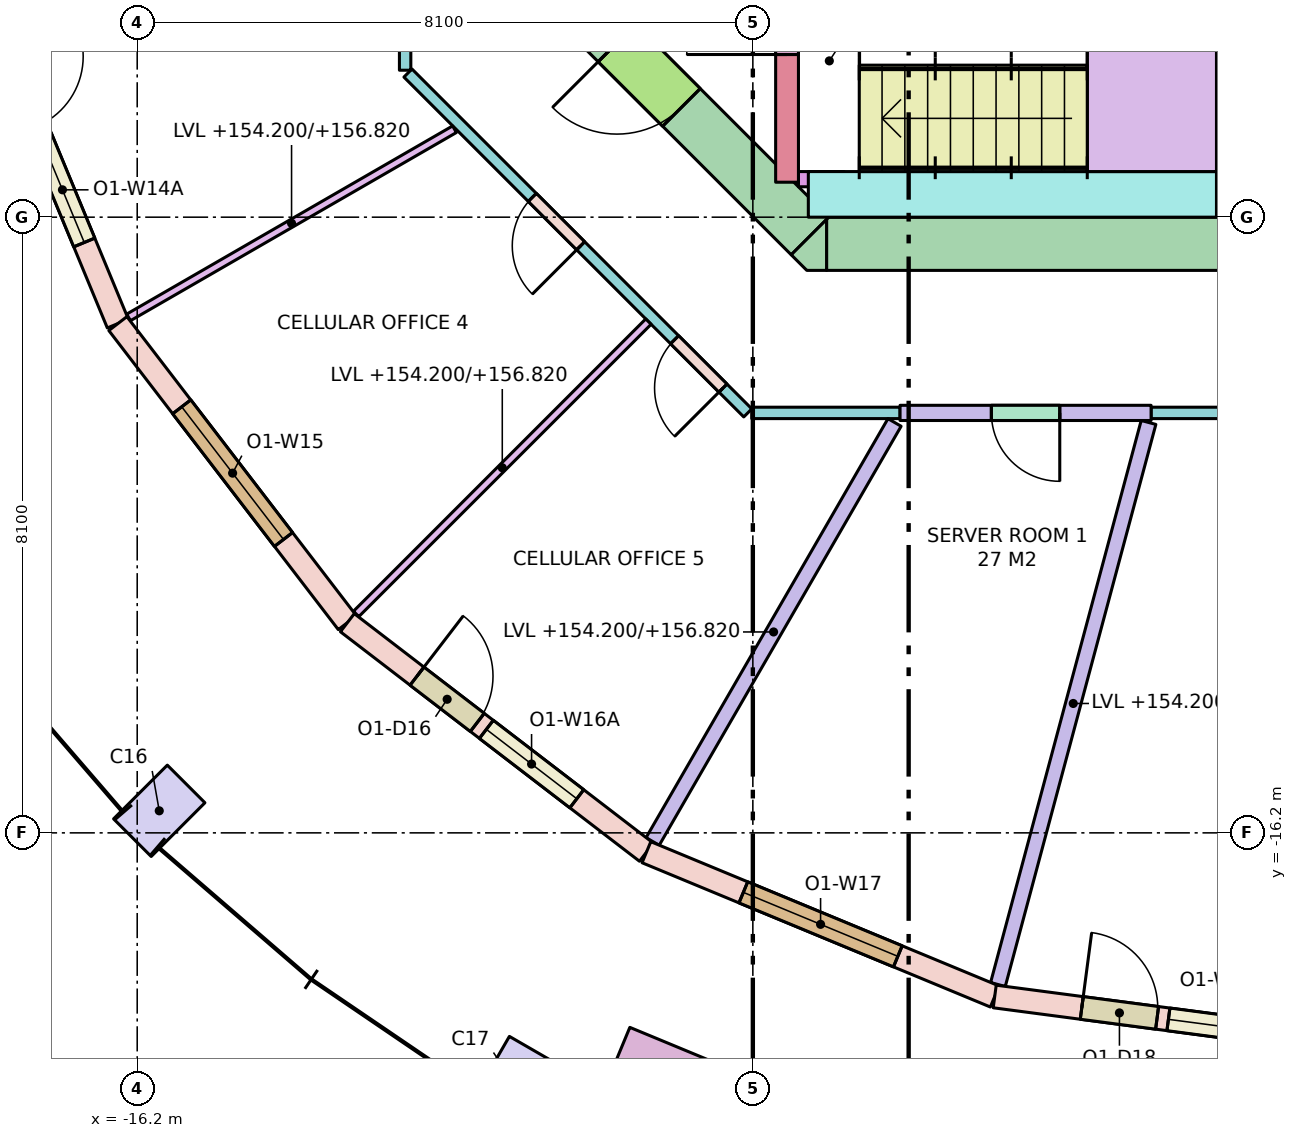
"""IFC4 building model, lengths in metres.
Left out: names, types, materials, properties, quantities, classifications, styles, units other than length and angle.
Written with IfcOpenShell. Run it as: python <this file> out.ifc"""

import sys

from ifc_helpers import new_model, si_unit, direction, frame, frame_2d, origin, origin_2d, place, context, subcontext, project, spatial, polyline, rectangle, outline, extrude, element, fill, save


model = new_model("IFC4")
c1 = context("Model", 3, precision=1e-05, world=origin(), true_north=direction((0.0, 1.0)))
c2 = subcontext(c1, "Body", "Model", "MODEL_VIEW")
j1 = project(units=[si_unit("LENGTHUNIT", "METRE"), si_unit("PLANEANGLEUNIT", "RADIAN")], contexts=[c1])
p1 = place(None, origin())
s1 = spatial("IfcSite", under=j1, at=p1, CompositionType="ELEMENT")
p2 = place(p1, origin())
s2 = spatial("IfcBuilding", under=s1, at=p2, CompositionType="ELEMENT")
p3 = place(p2, frame((0.0, 0.0, 154.2)))
s3 = spatial("IfcBuildingStorey", under=s2, at=p3, CompositionType="ELEMENT", Elevation=154.2)
for number, where, z_axis, x_axis in (
    (1, (-15.91, -15.91, 0.0), (0.0, 0.0, 1.0), (0.707, -0.707, 0.0)),
    (2, (-11.25, -19.486, 0.0), (0.0, 0.0, 1.0), (0.866, -0.5, 0.0)),
):
    element("IfcColumn", number, at=place(p3, frame(where, z_axis=z_axis, x_axis=x_axis)), inside=s3, PredefinedType="COLUMN", context=c2, shape_type="SweptSolid", body=[
        extrude(rectangle(XDim=0.7, YDim=1.0, at=origin_2d()), origin(), (0.0, 0.0, 1.0), 3.7),
    ])
p4 = place(p3, frame((-7.13, -8.45, -0.28), z_axis=(0.0, 0.0, 1.0), x_axis=(1.0, 0.0, 0.0)))
e3 = element("IfcWall", 3, at=p4, inside=s3, PredefinedType="SHEAR", context=c2, shape_type="SweptSolid", body=[
    extrude(rectangle(XDim=14.26, YDim=0.7, at=frame_2d((7.13, 0.0))), origin(), (0.0, 0.0, 1.0), 3.7),
])
p5 = place(p4, frame((8.08, 0.0, 0.28)))
e4 = element("IfcOpeningElement", 4, at=p5, cuts=e3, PredefinedType="OPENING", context=c2, shape_type="SweptSolid", body=[
    extrude(rectangle(XDim=0.7, YDim=2.1, at=frame_2d((0.35, 1.05))), frame((0.0, 0.36, 0.0), z_axis=(0.0, -1.0, 0.0), x_axis=(1.0, 0.0, 0.0)), (0.0, 0.0, 1.0), 0.72),
])
p6 = place(p4, frame((6.205, 0.0, 0.28)))
e5 = element("IfcOpeningElement", 5, at=p6, cuts=e3, PredefinedType="OPENING", context=c2, shape_type="SweptSolid", body=[
    extrude(rectangle(XDim=0.9, YDim=2.1, at=frame_2d((0.45, 1.05))), frame((0.0, 0.36, 0.0), z_axis=(0.0, -1.0, 0.0), x_axis=(1.0, 0.0, 0.0)), (0.0, 0.0, 1.0), 0.72),
])
p7 = place(p4, frame((10.667, 0.0, 0.28)))
e6 = element("IfcOpeningElement", 6, at=p7, cuts=e3, PredefinedType="OPENING", context=c2, shape_type="SweptSolid", body=[
    extrude(rectangle(XDim=0.9, YDim=2.1, at=frame_2d((0.45, 1.05))), frame((0.0, 0.36, 0.0), z_axis=(0.0, -1.0, 0.0), x_axis=(1.0, 0.0, 0.0)), (0.0, 0.0, 1.0), 0.72),
])
p8 = place(p3, frame((-7.347, -8.347, -0.28), z_axis=(0.0, 0.0, 1.0), x_axis=(-0.707106781187, 0.707106781187, 0.0)))
e7 = element("IfcWall", 7, at=p8, inside=s3, PredefinedType="SHEAR", context=c2, shape_type="SweptSolid", body=[
    extrude(rectangle(XDim=4.243, YDim=0.7, at=frame_2d((2.121, 0.0))), origin(), (0.0, 0.0, 1.0), 3.7),
])
p9 = place(p8, frame((2.393, 0.0, 0.28)))
e8 = element("IfcOpeningElement", 8, at=p9, cuts=e7, PredefinedType="OPENING", context=c2, shape_type="SweptSolid", body=[
    extrude(rectangle(XDim=1.2, YDim=2.1, at=frame_2d((0.6, 1.05))), frame((0.0, 0.36, 0.0), z_axis=(0.0, -1.0, 0.0), x_axis=(1.0, 0.0, 0.0)), (0.0, 0.0, 1.0), 0.72),
])
p10 = place(p3, frame((0.0, 0.0, -0.28)))
e9 = element("IfcWall", 9, at=p10, inside=s3, PredefinedType="SHEAR", context=c2, shape_type="SweptSolid", body=[
    extrude(outline(polyline([(-7.39, -8.8), (-7.595, -8.595), (-7.595, -8.595), (-7.595, -8.595), (-7.13, -8.13), (-7.13, -8.8), (-7.13, -8.8), (-7.39, -8.8)])), origin(), (0.0, 0.0, 1.0), 3.7),
])
p11 = place(p3, frame((-1.85, -8.1, 0.0), z_axis=(0.0, 0.0, 1.0), x_axis=(0.0, 1.0, 0.0)))
e10 = element("IfcWall", 10, at=p11, inside=s3, PredefinedType="SHEAR", context=c2, shape_type="SweptSolid", body=[
    extrude(rectangle(XDim=6.6, YDim=0.3, at=frame_2d((3.3, 0.0))), origin(), (0.0, 0.0, 1.0), 3.42),
])
p12 = place(p3, frame((-7.65, -7.64, 0.0), z_axis=(0.0, 0.0, 1.0), x_axis=(0.0, 1.0, 0.0)))
e11 = element("IfcWall", 11, at=p12, inside=s3, PredefinedType="SHEAR", context=c2, shape_type="SweptSolid", body=[
    extrude(rectangle(XDim=3.14, YDim=0.3, at=frame_2d((1.57, 0.0))), origin(), (0.0, 0.0, 1.0), 3.42),
])
p13 = place(p12, frame((1.68, 0.0, 0.0)))
e12 = element("IfcOpeningElement", 12, at=p13, cuts=e11, PredefinedType="OPENING", context=c2, shape_type="SweptSolid", body=[
    extrude(rectangle(XDim=1.32, YDim=2.1, at=frame_2d((0.66, 1.05))), frame((0.0, 0.16, 0.0), z_axis=(0.0, -1.0, 0.0), x_axis=(1.0, 0.0, 0.0)), (0.0, 0.0, 1.0), 0.32),
])
p14 = place(p3, frame((-7.5, -7.6, 0.0), z_axis=(0.0, 0.0, 1.0), x_axis=(1.0, 0.0, 0.0)))
e13 = element("IfcWall", 13, at=p14, inside=s3, PredefinedType="SHEAR", context=c2, shape_type="SweptSolid", body=[
    extrude(rectangle(XDim=0.6, YDim=0.2, at=frame_2d((0.3, 0.0))), origin(), (0.0, 0.0, 1.0), 3.42),
])
p15 = place(p3, frame((-7.37, -7.8, 0.0), z_axis=(0.0, 0.0, 1.0), x_axis=(1.0, 0.0, 0.0)))
e14 = element("IfcWall", 14, at=p15, inside=s3, PredefinedType="SHEAR", context=c2, shape_type="SweptSolid", body=[
    extrude(rectangle(XDim=5.37, YDim=0.6, at=frame_2d((2.685, 0.0))), origin(), (0.0, 0.0, 1.0), 3.42),
])
p16 = place(p3, frame((-18.353, -4.917, 0.0), z_axis=(0.0, 0.0, 1.0), x_axis=(0.382650301762, -0.923893254961, 0.0)))
e15 = element("IfcWall", 15, at=p16, inside=s3, PredefinedType="STANDARD", context=c2, shape_type="SweptSolid", body=[
    extrude(rectangle(XDim=4.96, YDim=0.3, at=frame_2d((2.48, 0.0))), origin(), (0.0, 0.0, 1.0), 3.42),
])
p17 = place(p16, frame((1.155, 0.0, 0.0)))
e16 = element("IfcOpeningElement", 16, at=p17, cuts=e15, PredefinedType="OPENING", context=c2, shape_type="SweptSolid", body=[
    extrude(rectangle(XDim=1.0, YDim=2.4, at=frame_2d((0.5, 1.2))), frame((0.0, 0.16, 0.0), z_axis=(0.0, -1.0, 0.0), x_axis=(1.0, 0.0, 0.0)), (0.0, 0.0, 1.0), 0.32),
])
p18 = place(p16, frame((2.305, 0.0, 0.8)))
e17 = element("IfcOpeningElement", 17, at=p18, cuts=e15, PredefinedType="OPENING", context=c2, shape_type="SweptSolid", body=[
    extrude(rectangle(XDim=1.5, YDim=2.4, at=frame_2d((0.75, 1.2))), frame((0.0, 0.16, 0.0), z_axis=(0.0, -1.0, 0.0), x_axis=(1.0, 0.0, 0.0)), (0.0, 0.0, 1.0), 0.32),
])
p19 = place(p3, frame((-16.455, -9.5, 0.0), z_axis=(0.0, 0.0, 1.0), x_axis=(0.608768356425, -0.793348024649, 0.0)))
e18 = element("IfcWall", 18, at=p19, inside=s3, PredefinedType="STANDARD", context=c2, shape_type="SweptSolid", body=[
    extrude(rectangle(XDim=4.96, YDim=0.3, at=frame_2d((2.48, 0.0))), origin(), (0.0, 0.0, 1.0), 3.42),
])
p20 = place(p19, frame((1.38, 0.0, 0.8)))
e19 = element("IfcOpeningElement", 19, at=p20, cuts=e18, PredefinedType="OPENING", context=c2, shape_type="SweptSolid", body=[
    extrude(rectangle(XDim=2.2, YDim=2.4, at=frame_2d((1.1, 1.2))), frame((0.0, 0.16, 0.0), z_axis=(0.0, -1.0, 0.0), x_axis=(1.0, 0.0, 0.0)), (0.0, 0.0, 1.0), 0.32),
])
p21 = place(p3, frame((-13.435, -13.435, 0.0), z_axis=(0.0, 0.0, 1.0), x_axis=(0.793348024649, -0.608768356425, 0.0)))
e20 = element("IfcWall", 20, at=p21, inside=s3, PredefinedType="STANDARD", context=c2, shape_type="SweptSolid", body=[
    extrude(rectangle(XDim=4.96, YDim=0.3, at=frame_2d((2.48, 0.0))), origin(), (0.0, 0.0, 1.0), 3.42),
])
p22 = place(p21, frame((1.155, 0.0, 0.0)))
e21 = element("IfcOpeningElement", 21, at=p22, cuts=e20, PredefinedType="OPENING", context=c2, shape_type="SweptSolid", body=[
    extrude(rectangle(XDim=1.0, YDim=2.4, at=frame_2d((0.5, 1.2))), frame((0.0, 0.16, 0.0), z_axis=(0.0, -1.0, 0.0), x_axis=(1.0, 0.0, 0.0)), (0.0, 0.0, 1.0), 0.32),
])
p23 = place(p21, frame((2.305, 0.0, 0.8)))
e22 = element("IfcOpeningElement", 22, at=p23, cuts=e20, PredefinedType="OPENING", context=c2, shape_type="SweptSolid", body=[
    extrude(rectangle(XDim=1.5, YDim=2.4, at=frame_2d((0.75, 1.2))), frame((0.0, 0.16, 0.0), z_axis=(0.0, -1.0, 0.0), x_axis=(1.0, 0.0, 0.0)), (0.0, 0.0, 1.0), 0.32),
])
p24 = place(p3, frame((-9.5, -16.455, 0.0), z_axis=(0.0, 0.0, 1.0), x_axis=(0.923893254961, -0.382650301762, 0.0)))
e23 = element("IfcWall", 23, at=p24, inside=s3, PredefinedType="STANDARD", context=c2, shape_type="SweptSolid", body=[
    extrude(rectangle(XDim=4.96, YDim=0.3, at=frame_2d((2.48, 0.0))), origin(), (0.0, 0.0, 1.0), 3.42),
])
p25 = place(p24, frame((1.38, 0.0, 0.8)))
e24 = element("IfcOpeningElement", 24, at=p25, cuts=e23, PredefinedType="OPENING", context=c2, shape_type="SweptSolid", body=[
    extrude(rectangle(XDim=2.2, YDim=2.4, at=frame_2d((1.1, 1.2))), frame((0.0, 0.16, 0.0), z_axis=(0.0, -1.0, 0.0), x_axis=(1.0, 0.0, 0.0)), (0.0, 0.0, 1.0), 0.32),
])
p26 = place(p3, frame((-4.917, -18.353, 0.0), z_axis=(0.0, 0.0, 1.0), x_axis=(0.991443234469, -0.130538549191, 0.0)))
e25 = element("IfcWall", 25, at=p26, inside=s3, PredefinedType="STANDARD", context=c2, shape_type="SweptSolid", body=[
    extrude(rectangle(XDim=4.96, YDim=0.3, at=frame_2d((2.48, 0.0))), origin(), (0.0, 0.0, 1.0), 3.42),
])
p27 = place(p26, frame((1.155, 0.0, 0.0)))
e26 = element("IfcOpeningElement", 26, at=p27, cuts=e25, PredefinedType="OPENING", context=c2, shape_type="SweptSolid", body=[
    extrude(rectangle(XDim=1.0, YDim=2.4, at=frame_2d((0.5, 1.2))), frame((0.0, 0.16, 0.0), z_axis=(0.0, -1.0, 0.0), x_axis=(1.0, 0.0, 0.0)), (0.0, 0.0, 1.0), 0.32),
])
p28 = place(p26, frame((2.305, 0.0, 0.8)))
e27 = element("IfcOpeningElement", 27, at=p28, cuts=e25, PredefinedType="OPENING", context=c2, shape_type="SweptSolid", body=[
    extrude(rectangle(XDim=1.5, YDim=2.4, at=frame_2d((0.75, 1.2))), frame((0.0, 0.16, 0.0), z_axis=(0.0, -1.0, 0.0), x_axis=(1.0, 0.0, 0.0)), (0.0, 0.0, 1.0), 0.32),
])
p29 = place(p3, frame((-9.814, -18.99, 0.0), z_axis=(0.0, 0.0, 1.0), x_axis=(0.923875488976, -0.382693194178, 0.0)))
e28 = element("IfcWall", 28, at=p29, inside=s3, PredefinedType="PARAPET", context=c2, shape_type="SweptSolid", body=[
    extrude(rectangle(XDim=3.6, YDim=0.5, at=frame_2d((1.8, 0.0))), origin(), (0.0, 0.0, 1.0), 0.9),
])
p30 = place(p3, frame((8.167, -10.675, 0.0), z_axis=(0.0, 0.0, 1.0), x_axis=(-1.0, 0.0, 0.0)))
e29 = element("IfcWall", 29, at=p30, inside=s3, PredefinedType="PARTITIONING", context=c2, shape_type="SweptSolid", body=[
    extrude(rectangle(XDim=11.027, YDim=0.15, at=frame_2d((5.513, 0.0))), origin(), (0.0, 0.0, 1.0), 2.62),
])
p31 = place(p30, frame((4.614, 0.0, 0.0)))
e30 = element("IfcOpeningElement", 30, at=p31, cuts=e29, PredefinedType="OPENING", context=c2, shape_type="SweptSolid", body=[
    extrude(rectangle(XDim=1.8, YDim=2.1, at=frame_2d((0.9, 1.05))), frame((0.0, 0.085, 0.0), z_axis=(0.0, -1.0, 0.0), x_axis=(1.0, 0.0, 0.0)), (0.0, 0.0, 1.0), 0.17),
])
p32 = place(p3, frame((-2.86, -10.675, 0.0), z_axis=(0.0, 0.0, 1.0), x_axis=(-1.0, 0.0, 0.0)))
e31 = element("IfcWall", 31, at=p32, inside=s3, PredefinedType="PARTITIONING", context=c2, shape_type="SweptSolid", body=[
    extrude(rectangle(XDim=3.303, YDim=0.2, at=frame_2d((1.651, 0.0))), origin(), (0.0, 0.0, 1.0), 2.62),
])
p33 = place(p32, frame((1.201, 0.0, 0.0)))
e32 = element("IfcOpeningElement", 32, at=p33, cuts=e31, PredefinedType="OPENING", context=c2, shape_type="SweptSolid", body=[
    extrude(rectangle(XDim=0.9, YDim=2.1, at=frame_2d((0.45, 1.05))), frame((0.0, 0.11, 0.0), z_axis=(0.0, -1.0, 0.0), x_axis=(1.0, 0.0, 0.0)), (0.0, 0.0, 1.0), 0.22),
])
p34 = place(p3, frame((-6.163, -10.675, 0.0), z_axis=(0.0, 0.0, 1.0), x_axis=(-1.0, 0.0, 0.0)))
e33 = element("IfcWall", 33, at=p34, inside=s3, PredefinedType="PARTITIONING", context=c2, shape_type="SweptSolid", body=[
    extrude(rectangle(XDim=1.951, YDim=0.15, at=frame_2d((0.976, 0.0))), origin(), (0.0, 0.0, 1.0), 2.62),
])
p35 = place(p3, frame((-8.167, -10.675, 0.0), z_axis=(0.0, 0.0, 1.0), x_axis=(-0.707106781187, 0.707106781187, 0.0)))
e34 = element("IfcWall", 34, at=p35, inside=s3, PredefinedType="PARTITIONING", context=c2, shape_type="SweptSolid", body=[
    extrude(rectangle(XDim=6.323, YDim=0.15, at=frame_2d((3.162, 0.0))), origin(), (0.0, 0.0, 1.0), 2.62),
])
p36 = place(p35, frame((3.11, 0.0, 0.0)))
e35 = element("IfcOpeningElement", 35, at=p36, cuts=e34, PredefinedType="OPENING", context=c2, shape_type="SweptSolid", body=[
    extrude(rectangle(XDim=0.9, YDim=2.1, at=frame_2d((0.45, 1.05))), frame((0.0, 0.085, 0.0), z_axis=(0.0, -1.0, 0.0), x_axis=(1.0, 0.0, 0.0)), (0.0, 0.0, 1.0), 0.17),
])
p37 = place(p35, frame((0.462, 0.0, 0.0)))
e36 = element("IfcOpeningElement", 36, at=p37, cuts=e34, PredefinedType="OPENING", context=c2, shape_type="SweptSolid", body=[
    extrude(rectangle(XDim=0.9, YDim=2.1, at=frame_2d((0.45, 1.05))), frame((0.0, 0.085, 0.0), z_axis=(0.0, -1.0, 0.0), x_axis=(1.0, 0.0, 0.0)), (0.0, 0.0, 1.0), 0.17),
])
p38 = place(p3, frame((-12.675, -6.167, 0.0), z_axis=(0.0, 0.0, 1.0), x_axis=(0.0, 1.0, 0.0)))
e37 = element("IfcWall", 37, at=p38, inside=s3, PredefinedType="PARTITIONING", context=c2, shape_type="SweptSolid", body=[
    extrude(rectangle(XDim=12.333, YDim=0.15, at=frame_2d((6.167, 0.0))), origin(), (0.0, 0.0, 1.0), 2.62),
])
p39 = place(p38, frame((10.473, 0.0, 0.0)))
e38 = element("IfcOpeningElement", 38, at=p39, cuts=e37, PredefinedType="OPENING", context=c2, shape_type="SweptSolid", body=[
    extrude(rectangle(XDim=0.9, YDim=2.1, at=frame_2d((0.45, 1.05))), frame((0.0, 0.085, 0.0), z_axis=(0.0, -1.0, 0.0), x_axis=(1.0, 0.0, 0.0)), (0.0, 0.0, 1.0), 0.17),
])
p40 = place(p38, frame((3.907, 0.0, 0.0)))
e39 = element("IfcOpeningElement", 39, at=p40, cuts=e37, PredefinedType="OPENING", context=c2, shape_type="SweptSolid", body=[
    extrude(rectangle(XDim=1.8, YDim=2.1, at=frame_2d((0.9, 1.05))), frame((0.0, 0.085, 0.0), z_axis=(0.0, -1.0, 0.0), x_axis=(1.0, 0.0, 0.0)), (0.0, 0.0, 1.0), 0.17),
])
p41 = place(p3, frame((-12.025, -6.943, 0.0), z_axis=(0.0, 0.0, 1.0), x_axis=(-0.866025463095, -0.499999897272, 0.0)))
e40 = element("IfcWall", 40, at=p41, inside=s3, PredefinedType="PARTITIONING", context=c2, shape_type="SweptSolid", body=[
    extrude(rectangle(XDim=4.951, YDim=0.1, at=frame_2d((2.476, 0.0))), origin(), (0.0, 0.0, 1.0), 2.62),
])
p42 = place(p3, frame((-9.474, -9.474, 0.0), z_axis=(0.0, 0.0, 1.0), x_axis=(-0.707106781187, -0.707106781187, 0.0)))
e41 = element("IfcWall", 41, at=p42, inside=s3, PredefinedType="PARTITIONING", context=c2, shape_type="SweptSolid", body=[
    extrude(rectangle(XDim=5.439, YDim=0.1, at=frame_2d((2.719, 0.0))), origin(), (0.0, 0.0, 1.0), 2.62),
])
p43 = place(p3, frame((-6.236, -10.801, 0.0), z_axis=(0.0, 0.0, 1.0), x_axis=(-0.500029003625, -0.866008657886, 0.0)))
e42 = element("IfcWall", 42, at=p43, inside=s3, PredefinedType="PARTITIONING", context=c2, shape_type="SweptSolid", body=[
    extrude(rectangle(XDim=6.365, YDim=0.2, at=frame_2d((3.183, 0.0))), origin(), (0.0, 0.0, 1.0), 2.62),
])
p44 = place(p3, frame((-2.894, -10.801, 0.0), z_axis=(0.0, 0.0, 1.0), x_axis=(-0.258807821336, -0.965928833618, 0.0)))
e43 = element("IfcWall", 43, at=p44, inside=s3, PredefinedType="PARTITIONING", context=c2, shape_type="SweptSolid", body=[
    extrude(rectangle(XDim=7.655, YDim=0.2, at=frame_2d((3.828, 0.0))), origin(), (0.0, 0.0, 1.0), 2.62),
])
p45 = place(p18, origin())
e44 = element("IfcWindow", 44, at=p45, inside=s3, PartitioningType="SINGLE_PANEL", PredefinedType="WINDOW", context=c2, shape_type="SweptSolid", body=[
    extrude(rectangle(XDim=1.5, YDim=2.4, at=frame_2d((0.75, 1.2))), frame((0.0, 0.03, 0.0), z_axis=(0.0, -1.0, 0.0), x_axis=(1.0, 0.0, 0.0)), (0.0, 0.0, 1.0), 0.06),
])
fill(e17, e44)
p46 = place(p20, origin())
e45 = element("IfcWindow", 45, at=p46, inside=s3, PartitioningType="SINGLE_PANEL", PredefinedType="WINDOW", context=c2, shape_type="SweptSolid", body=[
    extrude(rectangle(XDim=2.2, YDim=2.4, at=frame_2d((1.1, 1.2))), frame((0.0, 0.03, 0.0), z_axis=(0.0, -1.0, 0.0), x_axis=(1.0, 0.0, 0.0)), (0.0, 0.0, 1.0), 0.06),
])
fill(e19, e45)
p47 = place(p22, origin())
e46 = element("IfcDoor", 46, at=p47, inside=s3, OperationType="SINGLE_SWING_LEFT", PredefinedType="DOOR", context=c2, shape_type="SweptSolid", body=[
    extrude(rectangle(XDim=1.0, YDim=2.4, at=frame_2d((0.5, 1.2))), frame((0.0, 0.025, 0.0), z_axis=(0.0, -1.0, 0.0), x_axis=(1.0, 0.0, 0.0)), (0.0, 0.0, 1.0), 0.05),
])
fill(e21, e46)
p48 = place(p23, origin())
e47 = element("IfcWindow", 47, at=p48, inside=s3, PartitioningType="SINGLE_PANEL", PredefinedType="WINDOW", context=c2, shape_type="SweptSolid", body=[
    extrude(rectangle(XDim=1.5, YDim=2.4, at=frame_2d((0.75, 1.2))), frame((0.0, 0.03, 0.0), z_axis=(0.0, -1.0, 0.0), x_axis=(1.0, 0.0, 0.0)), (0.0, 0.0, 1.0), 0.06),
])
fill(e22, e47)
p49 = place(p25, origin())
e48 = element("IfcWindow", 48, at=p49, inside=s3, PartitioningType="SINGLE_PANEL", PredefinedType="WINDOW", context=c2, shape_type="SweptSolid", body=[
    extrude(rectangle(XDim=2.2, YDim=2.4, at=frame_2d((1.1, 1.2))), frame((0.0, 0.03, 0.0), z_axis=(0.0, -1.0, 0.0), x_axis=(1.0, 0.0, 0.0)), (0.0, 0.0, 1.0), 0.06),
])
fill(e24, e48)
p50 = place(p27, origin())
e49 = element("IfcDoor", 49, at=p50, inside=s3, OperationType="SINGLE_SWING_LEFT", PredefinedType="DOOR", context=c2, shape_type="SweptSolid", body=[
    extrude(rectangle(XDim=1.0, YDim=2.4, at=frame_2d((0.5, 1.2))), frame((0.0, 0.025, 0.0), z_axis=(0.0, -1.0, 0.0), x_axis=(1.0, 0.0, 0.0)), (0.0, 0.0, 1.0), 0.05),
])
fill(e26, e49)
p51 = place(p28, origin())
e50 = element("IfcWindow", 50, at=p51, inside=s3, PartitioningType="SINGLE_PANEL", PredefinedType="WINDOW", context=c2, shape_type="SweptSolid", body=[
    extrude(rectangle(XDim=1.5, YDim=2.4, at=frame_2d((0.75, 1.2))), frame((0.0, 0.03, 0.0), z_axis=(0.0, -1.0, 0.0), x_axis=(1.0, 0.0, 0.0)), (0.0, 0.0, 1.0), 0.06),
])
fill(e27, e50)
p52 = place(p13, origin())
e51 = element("IfcDoor", 51, at=p52, inside=s3, OperationType="DOUBLE_DOOR_SINGLE_SWING", PredefinedType="DOOR", context=c2, shape_type="SweptSolid", body=[
    extrude(rectangle(XDim=1.32, YDim=2.1, at=frame_2d((0.66, 1.05))), frame((0.0, 0.025, 0.0), z_axis=(0.0, -1.0, 0.0), x_axis=(1.0, 0.0, 0.0)), (0.0, 0.0, 1.0), 0.05),
])
fill(e12, e51)
p53 = place(p9, origin())
e52 = element("IfcDoor", 52, at=p53, inside=s3, OperationType="SINGLE_SWING_RIGHT", PredefinedType="DOOR", context=c2, shape_type="SweptSolid", body=[
    extrude(rectangle(XDim=1.2, YDim=2.1, at=frame_2d((0.6, 1.05))), frame((0.0, 0.025, 0.0), z_axis=(0.0, -1.0, 0.0), x_axis=(1.0, 0.0, 0.0)), (0.0, 0.0, 1.0), 0.05),
])
fill(e8, e52)
p54 = place(p36, origin())
e53 = element("IfcDoor", 53, at=p54, inside=s3, OperationType="SINGLE_SWING_LEFT", PredefinedType="DOOR", context=c2, shape_type="SweptSolid", body=[
    extrude(rectangle(XDim=0.9, YDim=2.1, at=frame_2d((0.45, 1.05))), frame((0.0, 0.025, 0.0), z_axis=(0.0, -1.0, 0.0), x_axis=(1.0, 0.0, 0.0)), (0.0, 0.0, 1.0), 0.05),
])
fill(e35, e53)
p55 = place(p37, origin())
e54 = element("IfcDoor", 54, at=p55, inside=s3, OperationType="SINGLE_SWING_LEFT", PredefinedType="DOOR", context=c2, shape_type="SweptSolid", body=[
    extrude(rectangle(XDim=0.9, YDim=2.1, at=frame_2d((0.45, 1.05))), frame((0.0, 0.025, 0.0), z_axis=(0.0, -1.0, 0.0), x_axis=(1.0, 0.0, 0.0)), (0.0, 0.0, 1.0), 0.05),
])
fill(e36, e54)
p56 = place(p33, origin())
e55 = element("IfcDoor", 55, at=p56, inside=s3, OperationType="SINGLE_SWING_LEFT", PredefinedType="DOOR", context=c2, shape_type="SweptSolid", body=[
    extrude(rectangle(XDim=0.9, YDim=2.1, at=frame_2d((0.45, 1.05))), frame((0.0, 0.025, 0.0), z_axis=(0.0, -1.0, 0.0), x_axis=(1.0, 0.0, 0.0)), (0.0, 0.0, 1.0), 0.05),
])
fill(e32, e55)
save(model, sys.argv[1])
